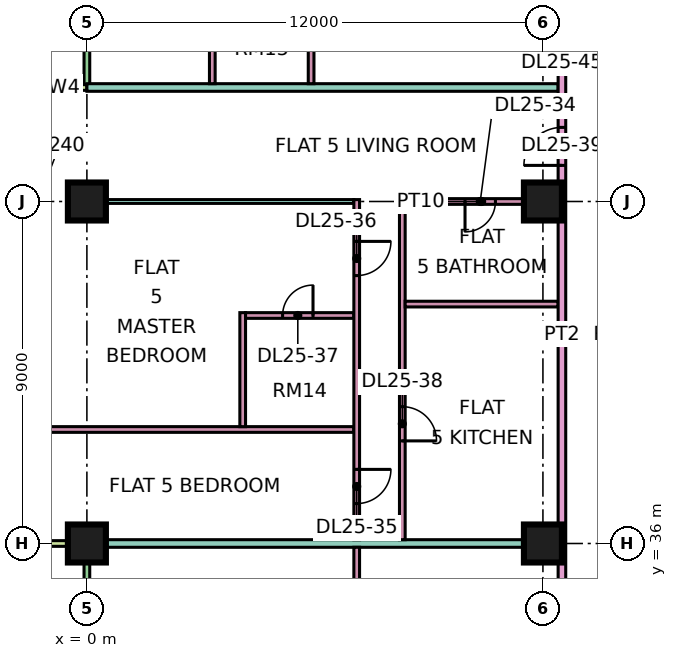
"""IFC4 building model, lengths in metres.
Left out: names, types, materials, properties, quantities, classifications, styles, units other than length and angle.
Written with IfcOpenShell. Run it as: python <this file> out.ifc"""

import sys

from ifc_helpers import new_model, si_unit, direction, frame, frame_2d, origin, origin_2d, place, context, subcontext, project, spatial, rectangle, extrude, element, fill, save


model = new_model("IFC4")
c1 = context("Model", 3, precision=1e-05, world=origin(), true_north=direction((0.0, 1.0)))
c2 = subcontext(c1, "Body", "Model", "MODEL_VIEW")
j1 = project(units=[si_unit("LENGTHUNIT", "METRE"), si_unit("PLANEANGLEUNIT", "RADIAN")], contexts=[c1])
p1 = place(None, origin())
s1 = spatial("IfcSite", under=j1, at=p1, CompositionType="ELEMENT")
p2 = place(p1, origin())
s2 = spatial("IfcBuilding", under=s1, at=p2, CompositionType="ELEMENT")
p3 = place(p2, frame((0.0, 0.0, 110.65)))
s3 = spatial("IfcBuildingStorey", under=s2, at=p3, CompositionType="ELEMENT", Elevation=110.65)
p4 = place(p3, frame((0.0, 36.0, 0.0), z_axis=(0.0, 0.0, 1.0), x_axis=(1.0, 0.0, 0.0)))
e1 = element("IfcColumn", 1, at=p4, inside=s3, PredefinedType="COLUMN", context=c2, shape_type="SweptSolid", body=[
    extrude(rectangle(XDim=1.0, YDim=1.0, at=origin_2d()), origin(), (0.0, 0.0, 1.0), 3.75),
])
p5 = place(p3, frame((0.0, 45.0, 0.0), z_axis=(0.0, 0.0, 1.0), x_axis=(1.0, 0.0, 0.0)))
e2 = element("IfcColumn", 2, at=p5, inside=s3, PredefinedType="COLUMN", context=c2, shape_type="SweptSolid", body=[
    extrude(rectangle(XDim=1.0, YDim=1.0, at=origin_2d()), origin(), (0.0, 0.0, 1.0), 3.75),
])
for number, where, z_axis, x_axis in (
    (3, (12.0, 36.0, 0.0), (0.0, 0.0, 1.0), (1.0, 0.0, 0.0)),
    (4, (12.0, 45.0, 0.0), (0.0, 0.0, 1.0), (1.0, 0.0, 0.0)),
):
    element("IfcColumn", number, at=place(p3, frame(where, z_axis=z_axis, x_axis=x_axis)), inside=s3, PredefinedType="COLUMN", context=c2, shape_type="SweptSolid", body=[
        extrude(rectangle(XDim=1.0, YDim=1.0, at=origin_2d()), origin(), (0.0, 0.0, 1.0), 3.75),
    ])
p6 = place(p3, frame((0.0, 61.425, 0.0), z_axis=(0.0, 0.0, 1.0), x_axis=(0.0, -1.0, 0.0)))
e5 = element("IfcWall", 5, at=p6, inside=s3, PredefinedType="SOLIDWALL", context=c2, shape_type="SweptSolid", body=[
    extrude(rectangle(XDim=13.35, YDim=0.15, at=frame_2d((6.675, 0.0))), origin(), (0.0, 0.0, 1.0), 3.35),
])
p7 = place(p6, frame((0.262, 0.0, 0.45)))
e6 = element("IfcOpeningElement", 6, at=p7, cuts=e5, PredefinedType="OPENING", context=c2, shape_type="SweptSolid", body=[
    extrude(rectangle(XDim=0.9, YDim=2.4, at=frame_2d((0.45, 1.2))), frame((0.0, 0.085, 0.0), z_axis=(0.0, -1.0, 0.0), x_axis=(1.0, 0.0, 0.0)), (0.0, 0.0, 1.0), 0.17),
])
p8 = place(p6, frame((3.225, 0.0, 0.0)))
e7 = element("IfcOpeningElement", 7, at=p8, cuts=e5, PredefinedType="OPENING", context=c2, shape_type="SweptSolid", body=[
    extrude(rectangle(XDim=1.8, YDim=2.4, at=frame_2d((0.9, 1.2))), frame((0.0, 0.085, 0.0), z_axis=(0.0, -1.0, 0.0), x_axis=(1.0, 0.0, 0.0)), (0.0, 0.0, 1.0), 0.17),
])
p9 = place(p6, frame((9.188, 0.0, 0.45)))
e8 = element("IfcOpeningElement", 8, at=p9, cuts=e5, PredefinedType="OPENING", context=c2, shape_type="SweptSolid", body=[
    extrude(rectangle(XDim=3.0, YDim=2.4, at=frame_2d((1.5, 1.2))), frame((0.0, 0.085, 0.0), z_axis=(0.0, -1.0, 0.0), x_axis=(1.0, 0.0, 0.0)), (0.0, 0.0, 1.0), 0.17),
])
p10 = place(p3, frame((-1.5, 48.0, 0.0), z_axis=(0.0, 0.0, 1.0), x_axis=(1.0, 0.0, 0.0)))
e9 = element("IfcWall", 9, at=p10, inside=s3, PredefinedType="SOLIDWALL", context=c2, shape_type="SweptSolid", body=[
    extrude(rectangle(XDim=1.5, YDim=0.15, at=frame_2d((0.75, 0.0))), origin(), (0.0, 0.0, 1.0), 3.35),
])
p11 = place(p3, frame((0.0, 35.925, 0.0), z_axis=(0.0, 0.0, 1.0), x_axis=(0.0, -1.0, 0.0)))
e10 = element("IfcWall", 10, at=p11, inside=s3, PredefinedType="SOLIDWALL", context=c2, shape_type="SweptSolid", body=[
    extrude(rectangle(XDim=11.85, YDim=0.15, at=frame_2d((5.925, 0.0))), origin(), (0.0, 0.0, 1.0), 3.35),
])
p12 = place(p11, frame((2.325, 0.0, 0.0)))
e11 = element("IfcOpeningElement", 11, at=p12, cuts=e10, PredefinedType="OPENING", context=c2, shape_type="SweptSolid", body=[
    extrude(rectangle(XDim=1.8, YDim=2.4, at=frame_2d((0.9, 1.2))), frame((0.0, 0.085, 0.0), z_axis=(0.0, -1.0, 0.0), x_axis=(1.0, 0.0, 0.0)), (0.0, 0.0, 1.0), 0.17),
])
p13 = place(p11, frame((7.125, 0.0, 0.45)))
e12 = element("IfcOpeningElement", 12, at=p13, cuts=e10, PredefinedType="OPENING", context=c2, shape_type="SweptSolid", body=[
    extrude(rectangle(XDim=3.0, YDim=2.4, at=frame_2d((1.5, 1.2))), frame((0.0, 0.085, 0.0), z_axis=(0.0, -1.0, 0.0), x_axis=(1.0, 0.0, 0.0)), (0.0, 0.0, 1.0), 0.17),
])
p14 = place(p3, frame((-1.5, 36.0, 0.0), z_axis=(0.0, 0.0, 1.0), x_axis=(1.0, 0.0, 0.0)))
e13 = element("IfcWall", 13, at=p14, inside=s3, PredefinedType="SOLIDWALL", context=c2, shape_type="SweptSolid", body=[
    extrude(rectangle(XDim=1.5, YDim=0.15, at=frame_2d((0.75, 0.0))), origin(), (0.0, 0.0, 1.0), 3.35),
])
p15 = place(p3, frame((-1.351, 39.0, 0.0), z_axis=(0.0, 0.0, 1.0), x_axis=(1.0, 0.0, 0.0)))
e14 = element("IfcWall", 14, at=p15, inside=s3, PredefinedType="PARTITIONING", context=c2, shape_type="SweptSolid", body=[
    extrude(rectangle(XDim=8.376, YDim=0.15, at=frame_2d((4.188, 0.0))), origin(), (0.0, 0.0, 1.0), 3.35),
])
e15 = element("IfcWall", 15, at=p4, inside=s3, PredefinedType="PARTITIONING", context=c2, shape_type="SweptSolid", body=[
    extrude(rectangle(XDim=12.4, YDim=0.2, at=frame_2d((6.2, 0.0))), origin(), (0.0, 0.0, 1.0), 3.35),
])
e16 = element("IfcWall", 16, at=p5, inside=s3, PredefinedType="PARTITIONING", context=c2, shape_type="SweptSolid", body=[
    extrude(rectangle(XDim=7.025, YDim=0.1, at=frame_2d((3.512, 0.0))), origin(), (0.0, 0.0, 1.0), 3.35),
])
p16 = place(p3, frame((0.0, 48.0, 0.0), z_axis=(0.0, 0.0, 1.0), x_axis=(1.0, 0.0, 0.0)))
e17 = element("IfcWall", 17, at=p16, inside=s3, PredefinedType="PARTITIONING", context=c2, shape_type="SweptSolid", body=[
    extrude(rectangle(XDim=12.4, YDim=0.2, at=frame_2d((6.2, 0.0))), origin(), (0.0, 0.0, 1.0), 3.35),
])
p17 = place(p3, frame((3.3, 48.1, 0.0), z_axis=(0.0, 0.0, 1.0), x_axis=(0.0, 1.0, 0.0)))
e18 = element("IfcWall", 18, at=p17, inside=s3, PredefinedType="PARTITIONING", context=c2, shape_type="SweptSolid", body=[
    extrude(rectangle(XDim=2.975, YDim=0.15, at=frame_2d((1.487, 0.0))), origin(), (0.0, 0.0, 1.0), 3.35),
])
p18 = place(p3, frame((4.1, 39.075, 0.0), z_axis=(0.0, 0.0, 1.0), x_axis=(0.0, 1.0, 0.0)))
e19 = element("IfcWall", 19, at=p18, inside=s3, PredefinedType="PARTITIONING", context=c2, shape_type="SweptSolid", body=[
    extrude(rectangle(XDim=3.0, YDim=0.15, at=frame_2d((1.5, 0.0))), origin(), (0.0, 0.0, 1.0), 3.35),
])
p19 = place(p3, frame((4.175, 42.0, 0.0), z_axis=(0.0, 0.0, 1.0), x_axis=(1.0, 0.0, 0.0)))
e20 = element("IfcWall", 20, at=p19, inside=s3, PredefinedType="PARTITIONING", context=c2, shape_type="SweptSolid", body=[
    extrude(rectangle(XDim=2.85, YDim=0.15, at=frame_2d((1.425, 0.0))), origin(), (0.0, 0.0, 1.0), 3.35),
])
p20 = place(p19, frame((0.975, 0.0, 0.0)))
e21 = element("IfcOpeningElement", 21, at=p20, cuts=e20, PredefinedType="OPENING", context=c2, shape_type="SweptSolid", body=[
    extrude(rectangle(XDim=0.8, YDim=2.1, at=frame_2d((0.4, 1.05))), frame((0.0, 0.085, 0.0), z_axis=(0.0, -1.0, 0.0), x_axis=(1.0, 0.0, 0.0)), (0.0, 0.0, 1.0), 0.17),
])
p21 = place(p3, frame((5.9, 48.1, 0.0), z_axis=(0.0, 0.0, 1.0), x_axis=(0.0, 1.0, 0.0)))
e22 = element("IfcWall", 22, at=p21, inside=s3, PredefinedType="PARTITIONING", context=c2, shape_type="SweptSolid", body=[
    extrude(rectangle(XDim=5.95, YDim=0.15, at=frame_2d((2.975, 0.0))), origin(), (0.0, 0.0, 1.0), 3.35),
])
p22 = place(p21, frame((3.95, 0.0, 0.0)))
e23 = element("IfcOpeningElement", 23, at=p22, cuts=e22, PredefinedType="OPENING", context=c2, shape_type="SweptSolid", body=[
    extrude(rectangle(XDim=0.9, YDim=2.1, at=frame_2d((0.45, 1.05))), frame((0.0, 0.085, 0.0), z_axis=(0.0, -1.0, 0.0), x_axis=(1.0, 0.0, 0.0)), (0.0, 0.0, 1.0), 0.17),
])
p23 = place(p3, frame((7.1, 26.925, 0.0), z_axis=(0.0, 0.0, 1.0), x_axis=(0.0, 1.0, 0.0)))
e24 = element("IfcWall", 24, at=p23, inside=s3, PredefinedType="PARTITIONING", context=c2, shape_type="SweptSolid", body=[
    extrude(rectangle(XDim=8.975, YDim=0.15, at=frame_2d((4.487, 0.0))), origin(), (0.0, 0.0, 1.0), 3.35),
])
p24 = place(p23, frame((1.125, 0.0, 0.0)))
e25 = element("IfcOpeningElement", 25, at=p24, cuts=e24, PredefinedType="OPENING", context=c2, shape_type="SweptSolid", body=[
    extrude(rectangle(XDim=0.8, YDim=2.1, at=frame_2d((0.4, 1.05))), frame((0.0, 0.085, 0.0), z_axis=(0.0, -1.0, 0.0), x_axis=(1.0, 0.0, 0.0)), (0.0, 0.0, 1.0), 0.17),
])
p25 = place(p23, frame((5.625, 0.0, 0.0)))
e26 = element("IfcOpeningElement", 26, at=p25, cuts=e24, PredefinedType="OPENING", context=c2, shape_type="SweptSolid", body=[
    extrude(rectangle(XDim=0.9, YDim=2.1, at=frame_2d((0.45, 1.05))), frame((0.0, 0.085, 0.0), z_axis=(0.0, -1.0, 0.0), x_axis=(1.0, 0.0, 0.0)), (0.0, 0.0, 1.0), 0.17),
])
p26 = place(p3, frame((7.1, 36.1, 0.0), z_axis=(0.0, 0.0, 1.0), x_axis=(0.0, 1.0, 0.0)))
e27 = element("IfcWall", 27, at=p26, inside=s3, PredefinedType="PARTITIONING", context=c2, shape_type="SweptSolid", body=[
    extrude(rectangle(XDim=8.95, YDim=0.15, at=frame_2d((4.475, 0.0))), origin(), (0.0, 0.0, 1.0), 3.35),
])
p27 = place(p26, frame((0.95, 0.0, 0.0)))
e28 = element("IfcOpeningElement", 28, at=p27, cuts=e27, PredefinedType="OPENING", context=c2, shape_type="SweptSolid", body=[
    extrude(rectangle(XDim=0.9, YDim=2.1, at=frame_2d((0.45, 1.05))), frame((0.0, 0.085, 0.0), z_axis=(0.0, -1.0, 0.0), x_axis=(1.0, 0.0, 0.0)), (0.0, 0.0, 1.0), 0.17),
])
p28 = place(p26, frame((6.95, 0.0, 0.0)))
e29 = element("IfcOpeningElement", 29, at=p28, cuts=e27, PredefinedType="OPENING", context=c2, shape_type="SweptSolid", body=[
    extrude(rectangle(XDim=0.9, YDim=2.1, at=frame_2d((0.45, 1.05))), frame((0.0, 0.085, 0.0), z_axis=(0.0, -1.0, 0.0), x_axis=(1.0, 0.0, 0.0)), (0.0, 0.0, 1.0), 0.17),
])
p29 = place(p3, frame((8.3, 36.1, 0.0), z_axis=(0.0, 0.0, 1.0), x_axis=(0.0, 1.0, 0.0)))
e30 = element("IfcWall", 30, at=p29, inside=s3, PredefinedType="PARTITIONING", context=c2, shape_type="SweptSolid", body=[
    extrude(rectangle(XDim=8.975, YDim=0.15, at=frame_2d((4.487, 0.0))), origin(), (0.0, 0.0, 1.0), 3.35),
])
p30 = place(p29, frame((2.6, 0.0, 0.0)))
e31 = element("IfcOpeningElement", 31, at=p30, cuts=e30, PredefinedType="OPENING", context=c2, shape_type="SweptSolid", body=[
    extrude(rectangle(XDim=0.9, YDim=2.1, at=frame_2d((0.45, 1.05))), frame((0.0, 0.085, 0.0), z_axis=(0.0, -1.0, 0.0), x_axis=(1.0, 0.0, 0.0)), (0.0, 0.0, 1.0), 0.17),
])
p31 = place(p3, frame((8.375, 42.3, 0.0), z_axis=(0.0, 0.0, 1.0), x_axis=(1.0, 0.0, 0.0)))
e32 = element("IfcWall", 32, at=p31, inside=s3, PredefinedType="PARTITIONING", context=c2, shape_type="SweptSolid", body=[
    extrude(rectangle(XDim=4.025, YDim=0.15, at=frame_2d((2.012, 0.0))), origin(), (0.0, 0.0, 1.0), 3.35),
])
p32 = place(p3, frame((8.375, 45.0, 0.0), z_axis=(0.0, 0.0, 1.0), x_axis=(1.0, 0.0, 0.0)))
e33 = element("IfcWall", 33, at=p32, inside=s3, PredefinedType="PARTITIONING", context=c2, shape_type="SweptSolid", body=[
    extrude(rectangle(XDim=4.025, YDim=0.15, at=frame_2d((2.012, 0.0))), origin(), (0.0, 0.0, 1.0), 3.35),
])
p33 = place(p32, frame((1.575, 0.0, 0.0)))
e34 = element("IfcOpeningElement", 34, at=p33, cuts=e33, PredefinedType="OPENING", context=c2, shape_type="SweptSolid", body=[
    extrude(rectangle(XDim=0.8, YDim=2.1, at=frame_2d((0.4, 1.05))), frame((0.0, 0.085, 0.0), z_axis=(0.0, -1.0, 0.0), x_axis=(1.0, 0.0, 0.0)), (0.0, 0.0, 1.0), 0.17),
])
p34 = place(p3, frame((12.5, 20.0, 0.0), z_axis=(0.0, 0.0, 1.0), x_axis=(0.0, 1.0, 0.0)))
e35 = element("IfcWall", 35, at=p34, inside=s3, PredefinedType="PARTITIONING", context=c2, shape_type="SweptSolid", body=[
    extrude(rectangle(XDim=43.0, YDim=0.2, at=frame_2d((21.5, 0.0))), origin(), (0.0, 0.0, 1.0), 3.35),
])
p35 = place(p34, frame((25.95, 0.0, 0.0)))
e36 = element("IfcOpeningElement", 36, at=p35, cuts=e35, PredefinedType="OPENING", context=c2, shape_type="SweptSolid", body=[
    extrude(rectangle(XDim=1.0, YDim=2.1, at=frame_2d((0.5, 1.05))), frame((0.0, 0.11, 0.0), z_axis=(0.0, -1.0, 0.0), x_axis=(1.0, 0.0, 0.0)), (0.0, 0.0, 1.0), 0.22),
])
p36 = place(p34, frame((29.25, 0.0, 0.0)))
e37 = element("IfcOpeningElement", 37, at=p36, cuts=e35, PredefinedType="OPENING", context=c2, shape_type="SweptSolid", body=[
    extrude(rectangle(XDim=1.0, YDim=2.1, at=frame_2d((0.5, 1.05))), frame((0.0, 0.11, 0.0), z_axis=(0.0, -1.0, 0.0), x_axis=(1.0, 0.0, 0.0)), (0.0, 0.0, 1.0), 0.22),
])
p37 = place(p34, frame((0.6, 0.0, 0.0)))
e38 = element("IfcOpeningElement", 38, at=p37, cuts=e35, PredefinedType="OPENING", context=c2, shape_type="SweptSolid", body=[
    extrude(rectangle(XDim=1.2, YDim=2.1, at=frame_2d((0.6, 1.05))), frame((0.0, 0.11, 0.0), z_axis=(0.0, -1.0, 0.0), x_axis=(1.0, 0.0, 0.0)), (0.0, 0.0, 1.0), 0.22),
])
p38 = place(p34, frame((4.65, 0.0, 0.0)))
e39 = element("IfcOpeningElement", 39, at=p38, cuts=e35, PredefinedType="OPENING", context=c2, shape_type="SweptSolid", body=[
    extrude(rectangle(XDim=1.0, YDim=2.1, at=frame_2d((0.5, 1.05))), frame((0.0, 0.11, 0.0), z_axis=(0.0, -1.0, 0.0), x_axis=(1.0, 0.0, 0.0)), (0.0, 0.0, 1.0), 0.22),
])
p39 = place(p33, frame((0.8, 0.0, 0.0), z_axis=(0.0, 0.0, 1.0), x_axis=(-1.0, 0.0, 0.0)))
e40 = element("IfcDoor", 40, at=p39, inside=s3, OperationType="SINGLE_SWING_LEFT", PredefinedType="DOOR", context=c2, shape_type="SweptSolid", body=[
    extrude(rectangle(XDim=0.8, YDim=2.1, at=frame_2d((0.4, 1.05))), frame((0.0, 0.025, 0.0), z_axis=(0.0, -1.0, 0.0), x_axis=(1.0, 0.0, 0.0)), (0.0, 0.0, 1.0), 0.05),
])
fill(e34, e40)
p40 = place(p27, origin())
e41 = element("IfcDoor", 41, at=p40, inside=s3, OperationType="SINGLE_SWING_RIGHT", PredefinedType="DOOR", context=c2, shape_type="SweptSolid", body=[
    extrude(rectangle(XDim=0.9, YDim=2.1, at=frame_2d((0.45, 1.05))), frame((0.0, 0.025, 0.0), z_axis=(0.0, -1.0, 0.0), x_axis=(1.0, 0.0, 0.0)), (0.0, 0.0, 1.0), 0.05),
])
fill(e28, e41)
p41 = place(p28, origin())
e42 = element("IfcDoor", 42, at=p41, inside=s3, OperationType="SINGLE_SWING_RIGHT", PredefinedType="DOOR", context=c2, shape_type="SweptSolid", body=[
    extrude(rectangle(XDim=0.9, YDim=2.1, at=frame_2d((0.45, 1.05))), frame((0.0, 0.025, 0.0), z_axis=(0.0, -1.0, 0.0), x_axis=(1.0, 0.0, 0.0)), (0.0, 0.0, 1.0), 0.05),
])
fill(e29, e42)
p42 = place(p20, frame((0.8, 0.0, 0.0), z_axis=(0.0, 0.0, 1.0), x_axis=(-1.0, 0.0, 0.0)))
e43 = element("IfcDoor", 43, at=p42, inside=s3, OperationType="SINGLE_SWING_RIGHT", PredefinedType="DOOR", context=c2, shape_type="SweptSolid", body=[
    extrude(rectangle(XDim=0.8, YDim=2.1, at=frame_2d((0.4, 1.05))), frame((0.0, 0.025, 0.0), z_axis=(0.0, -1.0, 0.0), x_axis=(1.0, 0.0, 0.0)), (0.0, 0.0, 1.0), 0.05),
])
fill(e21, e43)
p43 = place(p30, frame((0.9, 0.0, 0.0), z_axis=(0.0, 0.0, 1.0), x_axis=(-1.0, 0.0, 0.0)))
e44 = element("IfcDoor", 44, at=p43, inside=s3, OperationType="SINGLE_SWING_LEFT", PredefinedType="DOOR", context=c2, shape_type="SweptSolid", body=[
    extrude(rectangle(XDim=0.9, YDim=2.1, at=frame_2d((0.45, 1.05))), frame((0.0, 0.025, 0.0), z_axis=(0.0, -1.0, 0.0), x_axis=(1.0, 0.0, 0.0)), (0.0, 0.0, 1.0), 0.05),
])
fill(e31, e44)
p44 = place(p35, origin())
e45 = element("IfcDoor", 45, at=p44, inside=s3, OperationType="SINGLE_SWING_LEFT", PredefinedType="DOOR", context=c2, shape_type="SweptSolid", body=[
    extrude(rectangle(XDim=1.0, YDim=2.1, at=frame_2d((0.5, 1.05))), frame((0.0, 0.025, 0.0), z_axis=(0.0, -1.0, 0.0), x_axis=(1.0, 0.0, 0.0)), (0.0, 0.0, 1.0), 0.05),
])
fill(e36, e45)
save(model, sys.argv[1])
